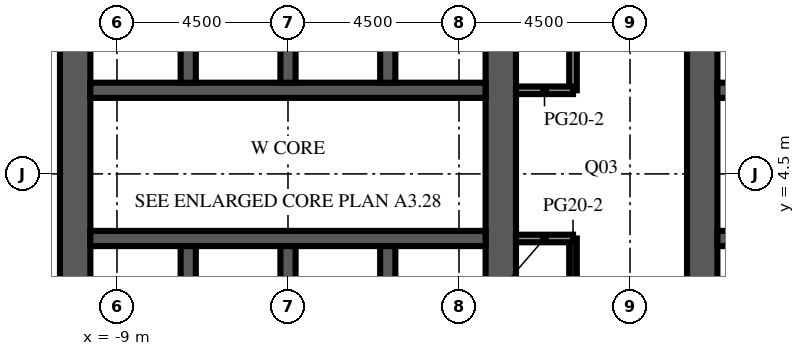
"""IFC4 building model, lengths in metres.
Left out: names, types, materials, properties, quantities, classifications, styles, units other than length and angle.
Written with IfcOpenShell. Run it as: python <this file> out.ifc"""

import sys

from ifc_helpers import new_model, si_unit, direction, frame, frame_2d, origin, place, context, subcontext, project, spatial, rectangle, extrude, element, fill, save


model = new_model("IFC4")
c1 = context("Model", 3, precision=1e-05, world=origin(), true_north=direction((0.0, 1.0)))
c2 = subcontext(c1, "Body", "Model", "MODEL_VIEW")
j1 = project(units=[si_unit("LENGTHUNIT", "METRE"), si_unit("PLANEANGLEUNIT", "RADIAN")], contexts=[c1])
p1 = place(None, origin())
s1 = spatial("IfcSite", under=j1, at=p1, CompositionType="ELEMENT")
p2 = place(p1, origin())
s2 = spatial("IfcBuilding", under=s1, at=p2, CompositionType="ELEMENT")
p3 = place(p2, frame((0.0, 0.0, 181.4)))
s3 = spatial("IfcBuildingStorey", under=s2, at=p3, CompositionType="ELEMENT", Elevation=181.4)
p4 = place(p3, frame((-10.1, -9.0, 0.0), z_axis=(0.0, 0.0, 1.0), x_axis=(0.0, 1.0, 0.0)))
e1 = element("IfcWall", 1, at=p4, inside=s3, PredefinedType="SHEAR", context=c2, shape_type="SweptSolid", body=[
    extrude(rectangle(XDim=27.5, YDim=0.8, at=frame_2d((13.75, 0.0))), origin(), (0.0, 0.0, 1.0), 4.1),
])
p5 = place(p4, frame((12.55, 0.0, 0.0)))
e2 = element("IfcOpeningElement", 2, at=p5, cuts=e1, PredefinedType="OPENING", context=c2, shape_type="SweptSolid", body=[
    extrude(rectangle(XDim=2.4, YDim=2.4, at=frame_2d((1.2, 1.2))), frame((0.0, 0.41, 0.0), z_axis=(0.0, -1.0, 0.0), x_axis=(1.0, 0.0, 0.0)), (0.0, 0.0, 1.0), 0.82),
])
p6 = place(p4, frame((6.825, 0.0, 0.0)))
e3 = element("IfcOpeningElement", 3, at=p6, cuts=e1, PredefinedType="OPENING", context=c2, shape_type="SweptSolid", body=[
    extrude(rectangle(XDim=1.2, YDim=2.1, at=frame_2d((0.6, 1.05))), frame((0.0, 0.41, 0.0), z_axis=(0.0, -1.0, 0.0), x_axis=(1.0, 0.0, 0.0)), (0.0, 0.0, 1.0), 0.82),
])
p7 = place(p4, frame((19.475, 0.0, 0.0)))
e4 = element("IfcOpeningElement", 4, at=p7, cuts=e1, PredefinedType="OPENING", context=c2, shape_type="SweptSolid", body=[
    extrude(rectangle(XDim=1.2, YDim=2.1, at=frame_2d((0.6, 1.05))), frame((0.0, 0.41, 0.0), z_axis=(0.0, -1.0, 0.0), x_axis=(1.0, 0.0, 0.0)), (0.0, 0.0, 1.0), 0.82),
])
p8 = place(p3, frame((1.1, -9.0, 0.0), z_axis=(0.0, 0.0, 1.0), x_axis=(0.0, 1.0, 0.0)))
e5 = element("IfcWall", 5, at=p8, inside=s3, PredefinedType="SHEAR", context=c2, shape_type="SweptSolid", body=[
    extrude(rectangle(XDim=27.5, YDim=0.8, at=frame_2d((13.75, 0.0))), origin(), (0.0, 0.0, 1.0), 4.1),
])
p9 = place(p8, frame((12.55, 0.0, 0.0)))
e6 = element("IfcOpeningElement", 6, at=p9, cuts=e5, PredefinedType="OPENING", context=c2, shape_type="SweptSolid", body=[
    extrude(rectangle(XDim=2.4, YDim=2.4, at=frame_2d((1.2, 1.2))), frame((0.0, 0.41, 0.0), z_axis=(0.0, -1.0, 0.0), x_axis=(1.0, 0.0, 0.0)), (0.0, 0.0, 1.0), 0.82),
])
p10 = place(p8, frame((3.85, 0.0, 0.0)))
e7 = element("IfcOpeningElement", 7, at=p10, cuts=e5, PredefinedType="OPENING", context=c2, shape_type="SweptSolid", body=[
    extrude(rectangle(XDim=0.95, YDim=2.1, at=frame_2d((0.475, 1.05))), frame((0.0, 0.41, 0.0), z_axis=(0.0, -1.0, 0.0), x_axis=(1.0, 0.0, 0.0)), (0.0, 0.0, 1.0), 0.82),
])
p11 = place(p8, frame((23.475, 0.0, 0.0)))
e8 = element("IfcOpeningElement", 8, at=p11, cuts=e5, PredefinedType="OPENING", context=c2, shape_type="SweptSolid", body=[
    extrude(rectangle(XDim=1.2, YDim=2.1, at=frame_2d((0.6, 1.05))), frame((0.0, 0.41, 0.0), z_axis=(0.0, -1.0, 0.0), x_axis=(1.0, 0.0, 0.0)), (0.0, 0.0, 1.0), 0.82),
])
p12 = place(p3, frame((-9.7, 2.8, 0.0), z_axis=(0.0, 0.0, 1.0), x_axis=(1.0, 0.0, 0.0)))
e9 = element("IfcWall", 9, at=p12, inside=s3, PredefinedType="SHEAR", context=c2, shape_type="SweptSolid", body=[
    extrude(rectangle(XDim=10.4, YDim=0.4, at=frame_2d((5.2, 0.0))), origin(), (0.0, 0.0, 1.0), 4.1),
])
p13 = place(p12, frame((0.738, 0.0, 0.0)))
e10 = element("IfcOpeningElement", 10, at=p13, cuts=e9, PredefinedType="OPENING", context=c2, shape_type="SweptSolid", body=[
    extrude(rectangle(XDim=1.1, YDim=2.1, at=frame_2d((0.55, 1.05))), frame((0.0, 0.21, 0.0), z_axis=(0.0, -1.0, 0.0), x_axis=(1.0, 0.0, 0.0)), (0.0, 0.0, 1.0), 0.42),
])
p14 = place(p12, frame((3.337, 0.0, 0.0)))
e11 = element("IfcOpeningElement", 11, at=p14, cuts=e9, PredefinedType="OPENING", context=c2, shape_type="SweptSolid", body=[
    extrude(rectangle(XDim=1.1, YDim=2.1, at=frame_2d((0.55, 1.05))), frame((0.0, 0.21, 0.0), z_axis=(0.0, -1.0, 0.0), x_axis=(1.0, 0.0, 0.0)), (0.0, 0.0, 1.0), 0.42),
])
p15 = place(p12, frame((6.012, 0.0, 0.0)))
e12 = element("IfcOpeningElement", 12, at=p15, cuts=e9, PredefinedType="OPENING", context=c2, shape_type="SweptSolid", body=[
    extrude(rectangle(XDim=1.0, YDim=2.1, at=frame_2d((0.5, 1.05))), frame((0.0, 0.21, 0.0), z_axis=(0.0, -1.0, 0.0), x_axis=(1.0, 0.0, 0.0)), (0.0, 0.0, 1.0), 0.42),
])
p16 = place(p12, frame((8.613, 0.0, 0.0)))
e13 = element("IfcOpeningElement", 13, at=p16, cuts=e9, PredefinedType="OPENING", context=c2, shape_type="SweptSolid", body=[
    extrude(rectangle(XDim=1.0, YDim=2.1, at=frame_2d((0.5, 1.05))), frame((0.0, 0.21, 0.0), z_axis=(0.0, -1.0, 0.0), x_axis=(1.0, 0.0, 0.0)), (0.0, 0.0, 1.0), 0.42),
])
p17 = place(p3, frame((-9.7, 6.7, 0.0), z_axis=(0.0, 0.0, 1.0), x_axis=(1.0, 0.0, 0.0)))
e14 = element("IfcWall", 14, at=p17, inside=s3, PredefinedType="SHEAR", context=c2, shape_type="SweptSolid", body=[
    extrude(rectangle(XDim=10.4, YDim=0.4, at=frame_2d((5.2, 0.0))), origin(), (0.0, 0.0, 1.0), 4.1),
])
p18 = place(p17, frame((3.337, 0.0, 0.0)))
e15 = element("IfcOpeningElement", 15, at=p18, cuts=e14, PredefinedType="OPENING", context=c2, shape_type="SweptSolid", body=[
    extrude(rectangle(XDim=1.1, YDim=2.1, at=frame_2d((0.55, 1.05))), frame((0.0, 0.21, 0.0), z_axis=(0.0, -1.0, 0.0), x_axis=(1.0, 0.0, 0.0)), (0.0, 0.0, 1.0), 0.42),
])
p19 = place(p17, frame((5.962, 0.0, 0.0)))
e16 = element("IfcOpeningElement", 16, at=p19, cuts=e14, PredefinedType="OPENING", context=c2, shape_type="SweptSolid", body=[
    extrude(rectangle(XDim=1.1, YDim=2.1, at=frame_2d((0.55, 1.05))), frame((0.0, 0.21, 0.0), z_axis=(0.0, -1.0, 0.0), x_axis=(1.0, 0.0, 0.0)), (0.0, 0.0, 1.0), 0.42),
])
p20 = place(p17, frame((8.663, 0.0, 0.0)))
e17 = element("IfcOpeningElement", 17, at=p20, cuts=e14, PredefinedType="OPENING", context=c2, shape_type="SweptSolid", body=[
    extrude(rectangle(XDim=1.1, YDim=2.1, at=frame_2d((0.55, 1.05))), frame((0.0, 0.21, 0.0), z_axis=(0.0, -1.0, 0.0), x_axis=(1.0, 0.0, 0.0)), (0.0, 0.0, 1.0), 0.42),
])
p21 = place(p17, frame((0.688, 0.0, 0.0)))
e18 = element("IfcOpeningElement", 18, at=p21, cuts=e14, PredefinedType="OPENING", context=c2, shape_type="SweptSolid", body=[
    extrude(rectangle(XDim=1.0, YDim=2.1, at=frame_2d((0.5, 1.05))), frame((0.0, 0.21, 0.0), z_axis=(0.0, -1.0, 0.0), x_axis=(1.0, 0.0, 0.0)), (0.0, 0.0, 1.0), 0.42),
])
for number, where, z_axis, x_axis in (
    (19, (-7.125, -0.3, 0.0), (0.0, 0.0, 1.0), (0.0, 1.0, 0.0)),
    (20, (-7.125, 6.9, 0.0), (0.0, 0.0, 1.0), (0.0, 1.0, 0.0)),
    (21, (-4.5, -0.3, 0.0), (0.0, 0.0, 1.0), (0.0, 1.0, 0.0)),
    (22, (-4.5, 6.9, 0.0), (0.0, 0.0, 1.0), (0.0, 1.0, 0.0)),
    (23, (-1.875, -0.3, 0.0), (0.0, 0.0, 1.0), (0.0, 1.0, 0.0)),
    (24, (-1.875, 6.9, 0.0), (0.0, 0.0, 1.0), (0.0, 1.0, 0.0)),
):
    element("IfcWall", number, at=place(p3, frame(where, z_axis=z_axis, x_axis=x_axis)), inside=s3, PredefinedType="SHEAR", context=c2, shape_type="SweptSolid", body=[
        extrude(rectangle(XDim=2.9, YDim=0.4, at=frame_2d((1.45, 0.0))), origin(), (0.0, 0.0, 1.0), 4.1),
    ])
p22 = place(p3, frame((6.4, -9.0, 0.0), z_axis=(0.0, 0.0, 1.0), x_axis=(0.0, 1.0, 0.0)))
e25 = element("IfcWall", 25, at=p22, inside=s3, PredefinedType="SHEAR", context=c2, shape_type="SweptSolid", body=[
    extrude(rectangle(XDim=27.5, YDim=0.8, at=frame_2d((13.75, 0.0))), origin(), (0.0, 0.0, 1.0), 4.1),
])
p23 = place(p22, frame((12.55, 0.0, 0.0)))
e26 = element("IfcOpeningElement", 26, at=p23, cuts=e25, PredefinedType="OPENING", context=c2, shape_type="SweptSolid", body=[
    extrude(rectangle(XDim=2.4, YDim=2.4, at=frame_2d((1.2, 1.2))), frame((0.0, 0.41, 0.0), z_axis=(0.0, -1.0, 0.0), x_axis=(1.0, 0.0, 0.0)), (0.0, 0.0, 1.0), 0.82),
])
p24 = place(p22, frame((3.85, 0.0, 0.0)))
e27 = element("IfcOpeningElement", 27, at=p24, cuts=e25, PredefinedType="OPENING", context=c2, shape_type="SweptSolid", body=[
    extrude(rectangle(XDim=0.95, YDim=2.1, at=frame_2d((0.475, 1.05))), frame((0.0, 0.41, 0.0), z_axis=(0.0, -1.0, 0.0), x_axis=(1.0, 0.0, 0.0)), (0.0, 0.0, 1.0), 0.82),
])
p25 = place(p22, frame((23.475, 0.0, 0.0)))
e28 = element("IfcOpeningElement", 28, at=p25, cuts=e25, PredefinedType="OPENING", context=c2, shape_type="SweptSolid", body=[
    extrude(rectangle(XDim=1.2, YDim=2.1, at=frame_2d((0.6, 1.05))), frame((0.0, 0.41, 0.0), z_axis=(0.0, -1.0, 0.0), x_axis=(1.0, 0.0, 0.0)), (0.0, 0.0, 1.0), 0.82),
])
p26 = place(p3, frame((6.8, 2.8, 0.0), z_axis=(0.0, 0.0, 1.0), x_axis=(1.0, 0.0, 0.0)))
e29 = element("IfcWall", 29, at=p26, inside=s3, PredefinedType="SHEAR", context=c2, shape_type="SweptSolid", body=[
    extrude(rectangle(XDim=10.4, YDim=0.4, at=frame_2d((5.2, 0.0))), origin(), (0.0, 0.0, 1.0), 4.1),
])
p27 = place(p26, frame((0.738, 0.0, 0.0)))
e30 = element("IfcOpeningElement", 30, at=p27, cuts=e29, PredefinedType="OPENING", context=c2, shape_type="SweptSolid", body=[
    extrude(rectangle(XDim=1.1, YDim=2.1, at=frame_2d((0.55, 1.05))), frame((0.0, 0.21, 0.0), z_axis=(0.0, -1.0, 0.0), x_axis=(1.0, 0.0, 0.0)), (0.0, 0.0, 1.0), 0.42),
])
p28 = place(p26, frame((3.337, 0.0, 0.0)))
e31 = element("IfcOpeningElement", 31, at=p28, cuts=e29, PredefinedType="OPENING", context=c2, shape_type="SweptSolid", body=[
    extrude(rectangle(XDim=1.1, YDim=2.1, at=frame_2d((0.55, 1.05))), frame((0.0, 0.21, 0.0), z_axis=(0.0, -1.0, 0.0), x_axis=(1.0, 0.0, 0.0)), (0.0, 0.0, 1.0), 0.42),
])
p29 = place(p26, frame((6.012, 0.0, 0.0)))
e32 = element("IfcOpeningElement", 32, at=p29, cuts=e29, PredefinedType="OPENING", context=c2, shape_type="SweptSolid", body=[
    extrude(rectangle(XDim=1.0, YDim=2.1, at=frame_2d((0.5, 1.05))), frame((0.0, 0.21, 0.0), z_axis=(0.0, -1.0, 0.0), x_axis=(1.0, 0.0, 0.0)), (0.0, 0.0, 1.0), 0.42),
])
p30 = place(p26, frame((8.613, 0.0, 0.0)))
e33 = element("IfcOpeningElement", 33, at=p30, cuts=e29, PredefinedType="OPENING", context=c2, shape_type="SweptSolid", body=[
    extrude(rectangle(XDim=1.0, YDim=2.1, at=frame_2d((0.5, 1.05))), frame((0.0, 0.21, 0.0), z_axis=(0.0, -1.0, 0.0), x_axis=(1.0, 0.0, 0.0)), (0.0, 0.0, 1.0), 0.42),
])
p31 = place(p3, frame((6.8, 6.7, 0.0), z_axis=(0.0, 0.0, 1.0), x_axis=(1.0, 0.0, 0.0)))
e34 = element("IfcWall", 34, at=p31, inside=s3, PredefinedType="SHEAR", context=c2, shape_type="SweptSolid", body=[
    extrude(rectangle(XDim=10.4, YDim=0.4, at=frame_2d((5.2, 0.0))), origin(), (0.0, 0.0, 1.0), 4.1),
])
p32 = place(p31, frame((3.337, 0.0, 0.0)))
e35 = element("IfcOpeningElement", 35, at=p32, cuts=e34, PredefinedType="OPENING", context=c2, shape_type="SweptSolid", body=[
    extrude(rectangle(XDim=1.1, YDim=2.1, at=frame_2d((0.55, 1.05))), frame((0.0, 0.21, 0.0), z_axis=(0.0, -1.0, 0.0), x_axis=(1.0, 0.0, 0.0)), (0.0, 0.0, 1.0), 0.42),
])
p33 = place(p31, frame((5.962, 0.0, 0.0)))
e36 = element("IfcOpeningElement", 36, at=p33, cuts=e34, PredefinedType="OPENING", context=c2, shape_type="SweptSolid", body=[
    extrude(rectangle(XDim=1.1, YDim=2.1, at=frame_2d((0.55, 1.05))), frame((0.0, 0.21, 0.0), z_axis=(0.0, -1.0, 0.0), x_axis=(1.0, 0.0, 0.0)), (0.0, 0.0, 1.0), 0.42),
])
p34 = place(p31, frame((8.663, 0.0, 0.0)))
e37 = element("IfcOpeningElement", 37, at=p34, cuts=e34, PredefinedType="OPENING", context=c2, shape_type="SweptSolid", body=[
    extrude(rectangle(XDim=1.1, YDim=2.1, at=frame_2d((0.55, 1.05))), frame((0.0, 0.21, 0.0), z_axis=(0.0, -1.0, 0.0), x_axis=(1.0, 0.0, 0.0)), (0.0, 0.0, 1.0), 0.42),
])
p35 = place(p31, frame((0.688, 0.0, 0.0)))
e38 = element("IfcOpeningElement", 38, at=p35, cuts=e34, PredefinedType="OPENING", context=c2, shape_type="SweptSolid", body=[
    extrude(rectangle(XDim=1.0, YDim=2.1, at=frame_2d((0.5, 1.05))), frame((0.0, 0.21, 0.0), z_axis=(0.0, -1.0, 0.0), x_axis=(1.0, 0.0, 0.0)), (0.0, 0.0, 1.0), 0.42),
])
p36 = place(p3, frame((3.0, -3.5, 0.0), z_axis=(0.0, 0.0, 1.0), x_axis=(0.0, 1.0, 0.0)))
e39 = element("IfcWall", 39, at=p36, inside=s3, PredefinedType="PARTITIONING", context=c2, shape_type="SweptSolid", body=[
    extrude(rectangle(XDim=6.3, YDim=0.2, at=frame_2d((3.15, 0.0))), origin(), (0.0, 0.0, 1.0), 3.5),
])
p37 = place(p36, frame((2.6, 0.0, 0.0)))
e40 = element("IfcOpeningElement", 40, at=p37, cuts=e39, PredefinedType="OPENING", context=c2, shape_type="SweptSolid", body=[
    extrude(rectangle(XDim=1.0, YDim=2.1, at=frame_2d((0.5, 1.05))), frame((0.0, 0.11, 0.0), z_axis=(0.0, -1.0, 0.0), x_axis=(1.0, 0.0, 0.0)), (0.0, 0.0, 1.0), 0.22),
])
p38 = place(p3, frame((3.0, 6.7, 0.0), z_axis=(0.0, 0.0, 1.0), x_axis=(0.0, 1.0, 0.0)))
e41 = element("IfcWall", 41, at=p38, inside=s3, PredefinedType="PARTITIONING", context=c2, shape_type="SweptSolid", body=[
    extrude(rectangle(XDim=11.8, YDim=0.2, at=frame_2d((5.9, 0.0))), origin(), (0.0, 0.0, 1.0), 3.5),
])
p39 = place(p38, frame((4.35, 0.0, 0.0)))
e42 = element("IfcOpeningElement", 42, at=p39, cuts=e41, PredefinedType="OPENING", context=c2, shape_type="SweptSolid", body=[
    extrude(rectangle(XDim=1.0, YDim=2.1, at=frame_2d((0.5, 1.05))), frame((0.0, 0.11, 0.0), z_axis=(0.0, -1.0, 0.0), x_axis=(1.0, 0.0, 0.0)), (0.0, 0.0, 1.0), 0.22),
])
for number, where, z_axis, x_axis in (
    (43, (1.5, 2.8, 0.0), (0.0, 0.0, 1.0), (1.0, 0.0, 0.0)),
    (44, (1.5, 6.7, 0.0), (0.0, 0.0, 1.0), (1.0, 0.0, 0.0)),
):
    element("IfcWall", number, at=place(p3, frame(where, z_axis=z_axis, x_axis=x_axis)), inside=s3, PredefinedType="PARTITIONING", context=c2, shape_type="SweptSolid", body=[
        extrude(rectangle(XDim=1.5, YDim=0.2, at=frame_2d((0.75, 0.0))), origin(), (0.0, 0.0, 1.0), 3.5),
    ])
p40 = place(p13, origin())
e45 = element("IfcDoor", 45, at=p40, inside=s3, OperationType="DOUBLE_DOOR_SLIDING", PredefinedType="DOOR", context=c2, shape_type="SweptSolid", body=[
    extrude(rectangle(XDim=1.1, YDim=2.1, at=frame_2d((0.55, 1.05))), frame((0.0, 0.025, 0.0), z_axis=(0.0, -1.0, 0.0), x_axis=(1.0, 0.0, 0.0)), (0.0, 0.0, 1.0), 0.05),
])
fill(e10, e45)
p41 = place(p14, origin())
e46 = element("IfcDoor", 46, at=p41, inside=s3, OperationType="DOUBLE_DOOR_SLIDING", PredefinedType="DOOR", context=c2, shape_type="SweptSolid", body=[
    extrude(rectangle(XDim=1.1, YDim=2.1, at=frame_2d((0.55, 1.05))), frame((0.0, 0.025, 0.0), z_axis=(0.0, -1.0, 0.0), x_axis=(1.0, 0.0, 0.0)), (0.0, 0.0, 1.0), 0.05),
])
fill(e11, e46)
p42 = place(p18, origin())
e47 = element("IfcDoor", 47, at=p42, inside=s3, OperationType="DOUBLE_DOOR_SLIDING", PredefinedType="DOOR", context=c2, shape_type="SweptSolid", body=[
    extrude(rectangle(XDim=1.1, YDim=2.1, at=frame_2d((0.55, 1.05))), frame((0.0, 0.025, 0.0), z_axis=(0.0, -1.0, 0.0), x_axis=(1.0, 0.0, 0.0)), (0.0, 0.0, 1.0), 0.05),
])
fill(e15, e47)
p43 = place(p19, origin())
e48 = element("IfcDoor", 48, at=p43, inside=s3, OperationType="DOUBLE_DOOR_SLIDING", PredefinedType="DOOR", context=c2, shape_type="SweptSolid", body=[
    extrude(rectangle(XDim=1.1, YDim=2.1, at=frame_2d((0.55, 1.05))), frame((0.0, 0.025, 0.0), z_axis=(0.0, -1.0, 0.0), x_axis=(1.0, 0.0, 0.0)), (0.0, 0.0, 1.0), 0.05),
])
fill(e16, e48)
p44 = place(p20, origin())
e49 = element("IfcDoor", 49, at=p44, inside=s3, OperationType="DOUBLE_DOOR_SLIDING", PredefinedType="DOOR", context=c2, shape_type="SweptSolid", body=[
    extrude(rectangle(XDim=1.1, YDim=2.1, at=frame_2d((0.55, 1.05))), frame((0.0, 0.025, 0.0), z_axis=(0.0, -1.0, 0.0), x_axis=(1.0, 0.0, 0.0)), (0.0, 0.0, 1.0), 0.05),
])
fill(e17, e49)
p45 = place(p5, origin())
e50 = element("IfcDoor", 50, at=p45, inside=s3, OperationType="DOUBLE_DOOR_DOUBLE_SWING", PredefinedType="DOOR", context=c2, shape_type="SweptSolid", body=[
    extrude(rectangle(XDim=2.4, YDim=2.4, at=frame_2d((1.2, 1.2))), frame((0.0, 0.025, 0.0), z_axis=(0.0, -1.0, 0.0), x_axis=(1.0, 0.0, 0.0)), (0.0, 0.0, 1.0), 0.05),
])
fill(e2, e50)
p46 = place(p9, origin())
e51 = element("IfcDoor", 51, at=p46, inside=s3, OperationType="DOUBLE_DOOR_DOUBLE_SWING", PredefinedType="DOOR", context=c2, shape_type="SweptSolid", body=[
    extrude(rectangle(XDim=2.4, YDim=2.4, at=frame_2d((1.2, 1.2))), frame((0.0, 0.025, 0.0), z_axis=(0.0, -1.0, 0.0), x_axis=(1.0, 0.0, 0.0)), (0.0, 0.0, 1.0), 0.05),
])
fill(e6, e51)
p47 = place(p23, origin())
e52 = element("IfcDoor", 52, at=p47, inside=s3, OperationType="DOUBLE_DOOR_DOUBLE_SWING", PredefinedType="DOOR", context=c2, shape_type="SweptSolid", body=[
    extrude(rectangle(XDim=2.4, YDim=2.4, at=frame_2d((1.2, 1.2))), frame((0.0, 0.025, 0.0), z_axis=(0.0, -1.0, 0.0), x_axis=(1.0, 0.0, 0.0)), (0.0, 0.0, 1.0), 0.05),
])
fill(e26, e52)
p48 = place(p15, origin())
e53 = element("IfcDoor", 53, at=p48, inside=s3, OperationType="SINGLE_SWING_LEFT", PredefinedType="DOOR", context=c2, shape_type="SweptSolid", body=[
    extrude(rectangle(XDim=1.0, YDim=2.1, at=frame_2d((0.5, 1.05))), frame((0.0, 0.025, 0.0), z_axis=(0.0, -1.0, 0.0), x_axis=(1.0, 0.0, 0.0)), (0.0, 0.0, 1.0), 0.05),
])
fill(e12, e53)
p49 = place(p16, origin())
e54 = element("IfcDoor", 54, at=p49, inside=s3, OperationType="SINGLE_SWING_RIGHT", PredefinedType="DOOR", context=c2, shape_type="SweptSolid", body=[
    extrude(rectangle(XDim=1.0, YDim=2.1, at=frame_2d((0.5, 1.05))), frame((0.0, 0.025, 0.0), z_axis=(0.0, -1.0, 0.0), x_axis=(1.0, 0.0, 0.0)), (0.0, 0.0, 1.0), 0.05),
])
fill(e13, e54)
p50 = place(p21, origin())
e55 = element("IfcDoor", 55, at=p50, inside=s3, OperationType="SINGLE_SWING_LEFT", PredefinedType="DOOR", context=c2, shape_type="SweptSolid", body=[
    extrude(rectangle(XDim=1.0, YDim=2.1, at=frame_2d((0.5, 1.05))), frame((0.0, 0.025, 0.0), z_axis=(0.0, -1.0, 0.0), x_axis=(1.0, 0.0, 0.0)), (0.0, 0.0, 1.0), 0.05),
])
fill(e18, e55)
save(model, sys.argv[1])
